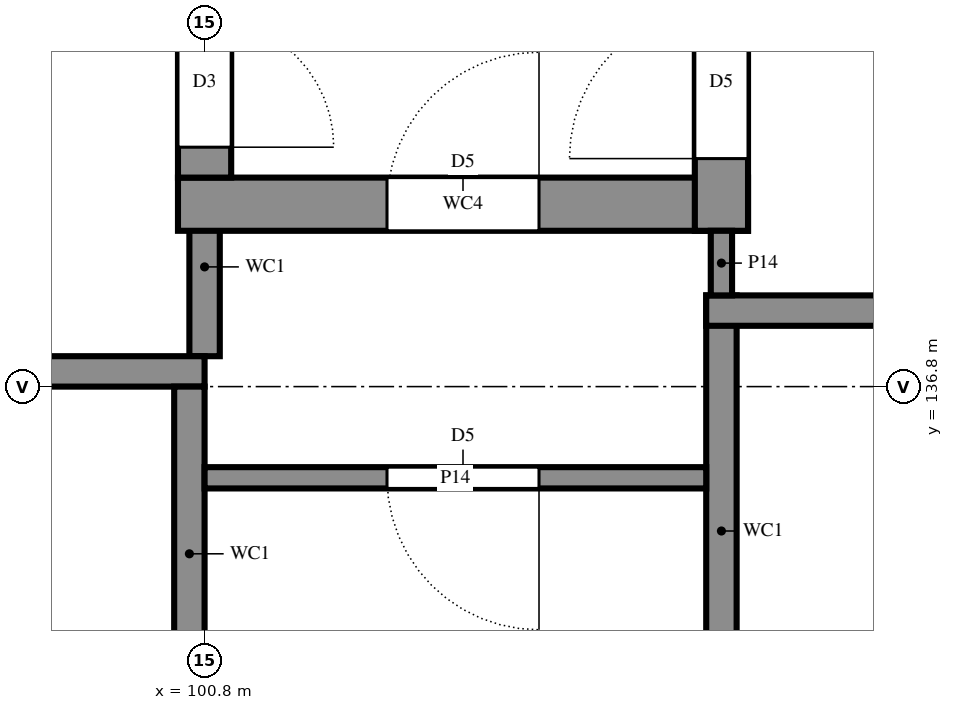
"""IFC4 building model, lengths in metres.
Left out: names, types, materials, properties, quantities, classifications, styles, units other than length and angle.
Written with IfcOpenShell. Run it as: python <this file> out.ifc"""

import sys

from ifc_helpers import new_model, si_unit, direction, frame, frame_2d, origin, place, context, subcontext, project, spatial, rectangle, extrude, element, fill, save


model = new_model("IFC4")
c1 = context("Model", 3, precision=1e-05, world=origin(), true_north=direction((0.0, 1.0)))
c2 = subcontext(c1, "Body", "Model", "MODEL_VIEW")
j1 = project(units=[si_unit("LENGTHUNIT", "METRE"), si_unit("PLANEANGLEUNIT", "RADIAN")], contexts=[c1])
p1 = place(None, origin())
s1 = spatial("IfcSite", under=j1, at=p1, CompositionType="ELEMENT")
p2 = place(p1, origin())
s2 = spatial("IfcBuilding", under=s1, at=p2, CompositionType="ELEMENT")
p3 = place(p2, origin())
s3 = spatial("IfcBuildingStorey", under=s2, at=p3, CompositionType="ELEMENT", Elevation=0.0)
p4 = place(p3, frame((100.8, 137.0, 0.0), z_axis=(0.0, 0.0, 1.0), x_axis=(0.0, 1.0, 0.0)))
e1 = element("IfcWall", 1, at=p4, inside=s3, PredefinedType="SHEAR", context=c2, shape_type="SweptSolid", body=[
    extrude(rectangle(XDim=1.175, YDim=0.2, at=frame_2d((0.587, 0.0))), origin(), (0.0, 0.0, 1.0), 3.6),
])
p5 = place(p3, frame((104.2, 137.4, 0.0), z_axis=(0.0, 0.0, 1.0), x_axis=(0.0, -1.0, 0.0)))
e2 = element("IfcWall", 2, at=p5, inside=s3, PredefinedType="SHEAR", context=c2, shape_type="SweptSolid", body=[
    extrude(rectangle(XDim=3.1, YDim=0.2, at=frame_2d((1.55, 0.0))), origin(), (0.0, 0.0, 1.0), 3.6),
])
p6 = place(p3, frame((108.2, 137.3, 0.0), z_axis=(0.0, 0.0, 1.0), x_axis=(-1.0, 0.0, 0.0)))
e3 = element("IfcWall", 3, at=p6, inside=s3, PredefinedType="SHEAR", context=c2, shape_type="SweptSolid", body=[
    extrude(rectangle(XDim=4.1, YDim=0.2, at=frame_2d((2.05, 0.0))), origin(), (0.0, 0.0, 1.0), 3.6),
])
p7 = place(p3, frame((100.625, 138.0, 0.0), z_axis=(0.0, 0.0, 1.0), x_axis=(1.0, 0.0, 0.0)))
e4 = element("IfcWall", 4, at=p7, inside=s3, PredefinedType="SHEAR", context=c2, shape_type="SweptSolid", body=[
    extrude(rectangle(XDim=3.75, YDim=0.35, at=frame_2d((1.875, 0.0))), origin(), (0.0, 0.0, 1.0), 3.6),
])
p8 = place(p7, frame((1.375, 0.0, 0.0)))
e5 = element("IfcOpeningElement", 5, at=p8, cuts=e4, PredefinedType="OPENING", context=c2, shape_type="SweptSolid", body=[
    extrude(rectangle(XDim=1.0, YDim=2.1, at=frame_2d((0.5, 1.05))), frame((0.0, 0.185, 0.0), z_axis=(0.0, -1.0, 0.0), x_axis=(1.0, 0.0, 0.0)), (0.0, 0.0, 1.0), 0.37),
])
p9 = place(p3, frame((104.2, 137.825, 0.0), z_axis=(0.0, 0.0, 1.0), x_axis=(0.0, 1.0, 0.0)))
e6 = element("IfcWall", 6, at=p9, inside=s3, PredefinedType="SHEAR", context=c2, shape_type="SweptSolid", body=[
    extrude(rectangle(XDim=3.475, YDim=0.35, at=frame_2d((1.738, 0.0))), origin(), (0.0, 0.0, 1.0), 3.6),
])
p10 = place(p9, frame((0.475, 0.0, 0.0)))
e7 = element("IfcOpeningElement", 7, at=p10, cuts=e6, PredefinedType="OPENING", context=c2, shape_type="SweptSolid", body=[
    extrude(rectangle(XDim=1.0, YDim=2.1, at=frame_2d((0.5, 1.05))), frame((0.0, 0.185, 0.0), z_axis=(0.0, -1.0, 0.0), x_axis=(1.0, 0.0, 0.0)), (0.0, 0.0, 1.0), 0.37),
])
p11 = place(p3, frame((100.8, 144.175, 0.0), z_axis=(0.0, 0.0, 1.0), x_axis=(0.0, -1.0, 0.0)))
e8 = element("IfcWall", 8, at=p11, inside=s3, PredefinedType="SHEAR", context=c2, shape_type="SweptSolid", body=[
    extrude(rectangle(XDim=6.0, YDim=0.35, at=frame_2d((3.0, 0.0))), origin(), (0.0, 0.0, 1.0), 3.6),
])
p12 = place(p11, frame((4.95, 0.0, 0.0)))
e9 = element("IfcOpeningElement", 9, at=p12, cuts=e8, PredefinedType="OPENING", context=c2, shape_type="SweptSolid", body=[
    extrude(rectangle(XDim=0.85, YDim=2.1, at=frame_2d((0.425, 1.05))), frame((0.0, 0.185, 0.0), z_axis=(0.0, -1.0, 0.0), x_axis=(1.0, 0.0, 0.0)), (0.0, 0.0, 1.0), 0.37),
])
p13 = place(p3, frame((98.4, 136.9, 0.0), z_axis=(0.0, 0.0, 1.0), x_axis=(1.0, 0.0, 0.0)))
e10 = element("IfcWall", 10, at=p13, inside=s3, PredefinedType="SHEAR", context=c2, shape_type="SweptSolid", body=[
    extrude(rectangle(XDim=2.4, YDim=0.2, at=frame_2d((1.2, 0.0))), origin(), (0.0, 0.0, 1.0), 3.6),
])
p14 = place(p3, frame((100.7, 134.6, 0.0), z_axis=(0.0, 0.0, 1.0), x_axis=(0.0, 1.0, 0.0)))
e11 = element("IfcWall", 11, at=p14, inside=s3, PredefinedType="SHEAR", context=c2, shape_type="SweptSolid", body=[
    extrude(rectangle(XDim=2.2, YDim=0.2, at=frame_2d((1.1, 0.0))), origin(), (0.0, 0.0, 1.0), 3.6),
])
p15 = place(p3, frame((100.8, 136.2, 0.0), z_axis=(0.0, 0.0, 1.0), x_axis=(1.0, 0.0, 0.0)))
e12 = element("IfcWall", 12, at=p15, inside=s3, PredefinedType="PARTITIONING", context=c2, shape_type="SweptSolid", body=[
    extrude(rectangle(XDim=3.3, YDim=0.14, at=frame_2d((1.65, 0.0))), origin(), (0.0, 0.0, 1.0), 3.42),
])
p16 = place(p15, frame((1.2, 0.0, 0.0)))
e13 = element("IfcOpeningElement", 13, at=p16, cuts=e12, PredefinedType="OPENING", context=c2, shape_type="SweptSolid", body=[
    extrude(rectangle(XDim=1.0, YDim=2.1, at=frame_2d((0.5, 1.05))), frame((0.0, 0.08, 0.0), z_axis=(0.0, -1.0, 0.0), x_axis=(1.0, 0.0, 0.0)), (0.0, 0.0, 1.0), 0.16),
])
p17 = place(p3, frame((104.2, 137.4, 0.0), z_axis=(0.0, 0.0, 1.0), x_axis=(0.0, 1.0, 0.0)))
e14 = element("IfcWall", 14, at=p17, inside=s3, PredefinedType="PARTITIONING", context=c2, shape_type="SweptSolid", body=[
    extrude(rectangle(XDim=0.425, YDim=0.14, at=frame_2d((0.212, 0.0))), origin(), (0.0, 0.0, 1.0), 3.42),
])
p18 = place(p16, frame((1.0, 0.0, 0.0), z_axis=(0.0, 0.0, 1.0), x_axis=(-1.0, 0.0, 0.0)))
e15 = element("IfcDoor", 15, at=p18, inside=s3, OperationType="SINGLE_SWING_RIGHT", PredefinedType="DOOR", context=c2, shape_type="SweptSolid", body=[
    extrude(rectangle(XDim=1.0, YDim=2.1, at=frame_2d((0.5, 1.05))), frame((0.0, 0.025, 0.0), z_axis=(0.0, -1.0, 0.0), x_axis=(1.0, 0.0, 0.0)), (0.0, 0.0, 1.0), 0.05),
])
fill(e13, e15)
p19 = place(p8, origin())
e16 = element("IfcDoor", 16, at=p19, inside=s3, OperationType="SINGLE_SWING_LEFT", PredefinedType="DOOR", context=c2, shape_type="SweptSolid", body=[
    extrude(rectangle(XDim=1.0, YDim=2.1, at=frame_2d((0.5, 1.05))), frame((0.0, 0.025, 0.0), z_axis=(0.0, -1.0, 0.0), x_axis=(1.0, 0.0, 0.0)), (0.0, 0.0, 1.0), 0.05),
])
fill(e5, e16)
p20 = place(p12, origin())
e17 = element("IfcDoor", 17, at=p20, inside=s3, OperationType="SINGLE_SWING_LEFT", PredefinedType="DOOR", context=c2, shape_type="SweptSolid", body=[
    extrude(rectangle(XDim=0.85, YDim=2.1, at=frame_2d((0.425, 1.05))), frame((0.0, 0.025, 0.0), z_axis=(0.0, -1.0, 0.0), x_axis=(1.0, 0.0, 0.0)), (0.0, 0.0, 1.0), 0.05),
])
fill(e9, e17)
p21 = place(p10, origin())
e18 = element("IfcDoor", 18, at=p21, inside=s3, OperationType="SINGLE_SWING_RIGHT", PredefinedType="DOOR", context=c2, shape_type="SweptSolid", body=[
    extrude(rectangle(XDim=1.0, YDim=2.1, at=frame_2d((0.5, 1.05))), frame((0.0, 0.025, 0.0), z_axis=(0.0, -1.0, 0.0), x_axis=(1.0, 0.0, 0.0)), (0.0, 0.0, 1.0), 0.05),
])
fill(e7, e18)
save(model, sys.argv[1])
